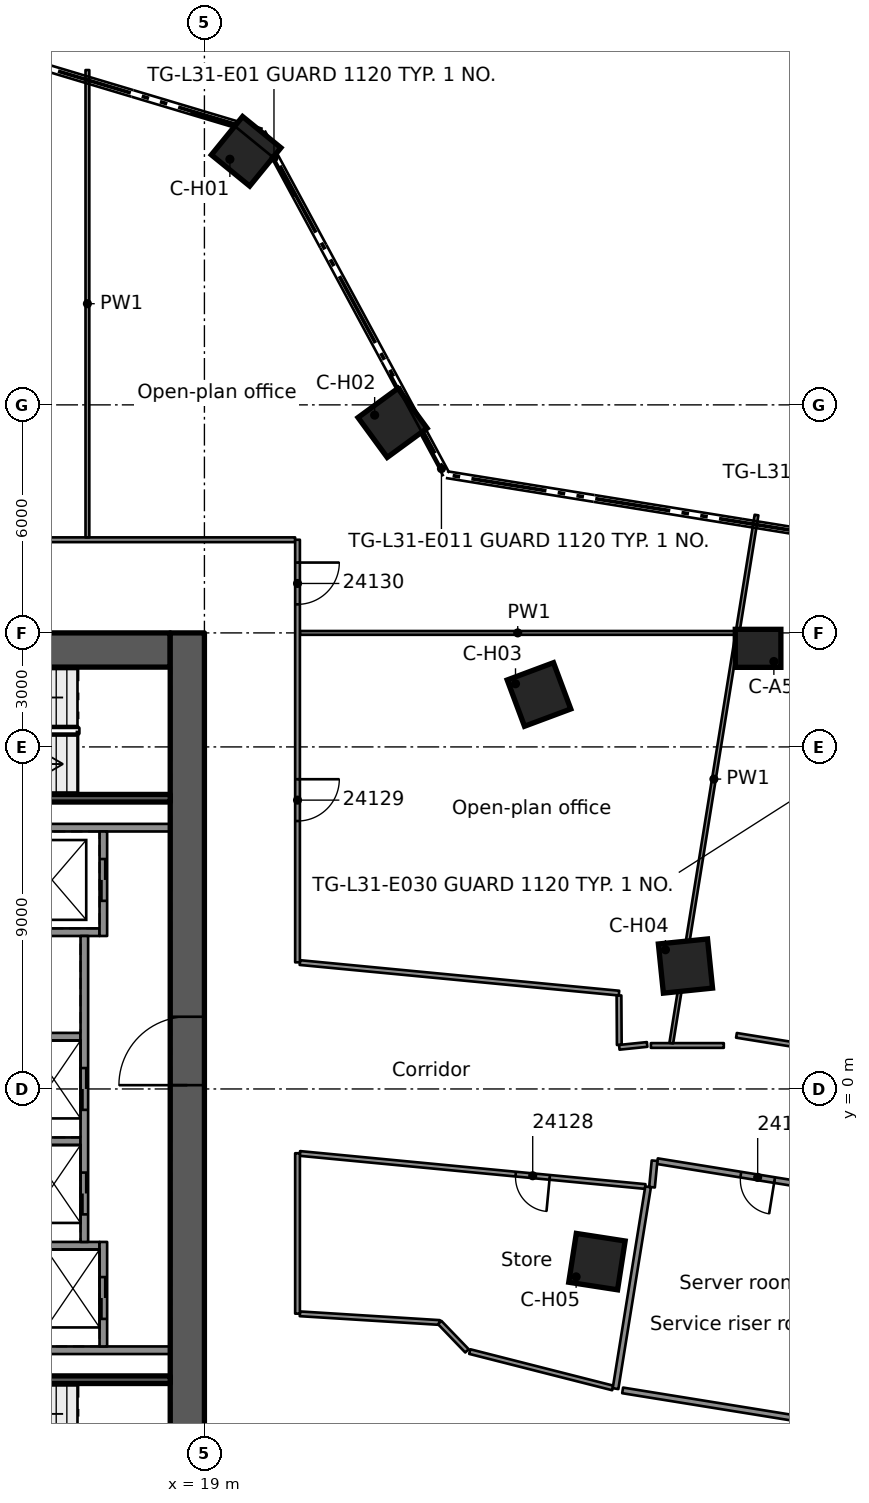
"""IFC4 building model, lengths in metres.
Left out: names, types, materials, properties, quantities, classifications, styles, units other than length and angle.
Written with IfcOpenShell. Run it as: python <this file> out.ifc"""

import sys

from ifc_helpers import new_model, si_unit, direction, frame, frame_2d, origin, origin_2d, place, context, subcontext, project, spatial, rectangle, extrude, element, fill, save


model = new_model("IFC4")
c1 = context("Model", 3, precision=1e-05, world=origin(), true_north=direction((0.0, 1.0)))
c2 = subcontext(c1, "Body", "Model", "MODEL_VIEW")
j1 = project(units=[si_unit("LENGTHUNIT", "METRE"), si_unit("PLANEANGLEUNIT", "RADIAN")], contexts=[c1])
p1 = place(None, origin())
s1 = spatial("IfcSite", under=j1, at=p1, CompositionType="ELEMENT")
p2 = place(p1, origin())
s2 = spatial("IfcBuilding", under=s1, at=p2, CompositionType="ELEMENT")
p3 = place(p2, frame((0.0, 0.0, 123.7)))
s3 = spatial("IfcBuildingStorey", under=s2, at=p3, CompositionType="ELEMENT", Elevation=123.7)
p4 = place(p3, frame((8.9, 11.55, 0.0), z_axis=(0.0, 0.0, 1.0), x_axis=(1.0, 0.0, 0.0)))
e1 = element("IfcWall", 1, at=p4, inside=s3, PredefinedType="SHEAR", context=c2, shape_type="SweptSolid", body=[
    extrude(rectangle(XDim=9.2, YDim=0.9, at=frame_2d((4.6, 0.0))), origin(), (0.0, 0.0, 1.0), 3.5),
])
p5 = place(p4, frame((3.0, 0.0, 0.0)))
e2 = element("IfcOpeningElement", 2, at=p5, cuts=e1, PredefinedType="OPENING", context=c2, shape_type="SweptSolid", body=[
    extrude(rectangle(XDim=1.1, YDim=2.1, at=frame_2d((0.55, 1.05))), frame((0.0, 0.46, 0.0), z_axis=(0.0, -1.0, 0.0), x_axis=(1.0, 0.0, 0.0)), (0.0, 0.0, 1.0), 0.92),
])
p6 = place(p3, frame((18.55, -12.0, 0.0), z_axis=(0.0, 0.0, 1.0), x_axis=(0.0, 1.0, 0.0)))
e3 = element("IfcWall", 3, at=p6, inside=s3, PredefinedType="SHEAR", context=c2, shape_type="SweptSolid", body=[
    extrude(rectangle(XDim=24.0, YDim=0.9, at=frame_2d((12.0, 0.0))), origin(), (0.0, 0.0, 1.0), 3.5),
])
p7 = place(p6, frame((12.1, 0.0, 0.0)))
e4 = element("IfcOpeningElement", 4, at=p7, cuts=e3, PredefinedType="OPENING", context=c2, shape_type="SweptSolid", body=[
    extrude(rectangle(XDim=1.8, YDim=2.1, at=frame_2d((0.9, 1.05))), frame((0.0, 0.46, 0.0), z_axis=(0.0, -1.0, 0.0), x_axis=(1.0, 0.0, 0.0)), (0.0, 0.0, 1.0), 0.92),
])
p8 = place(p3, frame((33.569, 11.594, 0.0), z_axis=(0.0, 0.0, 1.0), x_axis=(1.0, 0.0, 0.0)))
e5 = element("IfcColumn", 5, at=p8, inside=s3, PredefinedType="COLUMN", context=c2, shape_type="SweptSolid", body=[
    extrude(rectangle(XDim=1.2, YDim=1.0, at=origin_2d()), origin(), (0.0, 0.0, 1.0), 3.5),
])
for number, where, z_axis, x_axis in (
    (6, (20.098, 24.672, 0.0), (0.0, 0.0, 1.0), (0.632, 0.775, 0.0)),
    (7, (23.951, 17.526, 0.0), (0.0, 0.0, 1.0), (0.807, 0.591, 0.0)),
    (8, (27.804, 10.38, 0.0), (0.0, 0.0, 1.0), (0.937, 0.35, 0.0)),
    (9, (31.658, 3.234, 0.0), (0.0, 0.0, 1.0), (0.995, 0.102, 0.0)),
    (10, (29.329, -4.543, 0.0), (0.0, 0.0, 1.0), (0.988, -0.153, 0.0)),
):
    element("IfcColumn", number, at=place(p3, frame(where, z_axis=z_axis, x_axis=x_axis)), inside=s3, PredefinedType="COLUMN", context=c2, shape_type="SweptSolid", body=[
        extrude(rectangle(XDim=1.3, YDim=1.3, at=origin_2d()), origin(), (0.0, 0.0, 1.0), 3.5),
    ])
for number, where, z_axis, x_axis in (
    (11, (11.54, -6.875, 0.0), (0.0, 0.0, 1.0), (1.0, 0.0, 0.0)),
    (12, (11.54, 6.875, 0.0), (0.0, 0.0, 1.0), (1.0, 0.0, 0.0)),
):
    element("IfcWall", number, at=place(p3, frame(where, z_axis=z_axis, x_axis=x_axis)), inside=s3, PredefinedType="SOLIDWALL", context=c2, shape_type="SweptSolid", body=[
        extrude(rectangle(XDim=6.56, YDim=0.2, at=frame_2d((3.28, 0.0))), origin(), (0.0, 0.0, 1.0), 3.09),
    ])
p9 = place(p3, frame((11.54, 4.125, 0.0), z_axis=(0.0, 0.0, 1.0), x_axis=(1.0, 0.0, 0.0)))
e13 = element("IfcWall", 13, at=p9, inside=s3, PredefinedType="SOLIDWALL", context=c2, shape_type="SweptSolid", body=[
    extrude(rectangle(XDim=4.7, YDim=0.2, at=frame_2d((2.35, 0.0))), origin(), (0.0, 0.0, 1.0), 3.09),
])
for number, where, z_axis, x_axis in (
    (14, (11.54, 1.375, 0.0), (0.0, 0.0, 1.0), (1.0, 0.0, 0.0)),
    (15, (11.54, -1.375, 0.0), (0.0, 0.0, 1.0), (1.0, 0.0, 0.0)),
):
    element("IfcWall", number, at=place(p3, frame(where, z_axis=z_axis, x_axis=x_axis)), inside=s3, PredefinedType="SOLIDWALL", context=c2, shape_type="SweptSolid", body=[
        extrude(rectangle(XDim=4.2, YDim=0.2, at=frame_2d((2.1, 0.0))), origin(), (0.0, 0.0, 1.0), 3.09),
    ])
p10 = place(p3, frame((11.54, -4.125, 0.0), z_axis=(0.0, 0.0, 1.0), x_axis=(1.0, 0.0, 0.0)))
e16 = element("IfcWall", 16, at=p10, inside=s3, PredefinedType="SOLIDWALL", context=c2, shape_type="SweptSolid", body=[
    extrude(rectangle(XDim=4.7, YDim=0.2, at=frame_2d((2.35, 0.0))), origin(), (0.0, 0.0, 1.0), 3.09),
])
p11 = place(p3, frame((16.34, 6.775, 0.0), z_axis=(0.0, 0.0, 1.0), x_axis=(0.0, -1.0, 0.0)))
e17 = element("IfcWall", 17, at=p11, inside=s3, PredefinedType="SOLIDWALL", context=c2, shape_type="SweptSolid", body=[
    extrude(rectangle(XDim=2.75, YDim=0.2, at=frame_2d((1.375, 0.0))), origin(), (0.0, 0.0, 1.0), 3.09),
])
p12 = place(p11, frame((0.725, 0.0, 0.0)))
e18 = element("IfcOpeningElement", 18, at=p12, cuts=e17, PredefinedType="OPENING", context=c2, shape_type="SweptSolid", body=[
    extrude(rectangle(XDim=1.1, YDim=2.1, at=frame_2d((0.55, 1.05))), frame((0.0, 0.11, 0.0), z_axis=(0.0, -1.0, 0.0), x_axis=(1.0, 0.0, 0.0)), (0.0, 0.0, 1.0), 0.22),
])
p13 = place(p3, frame((15.84, 4.025, 0.0), z_axis=(0.0, 0.0, 1.0), x_axis=(0.0, -1.0, 0.0)))
e19 = element("IfcWall", 19, at=p13, inside=s3, PredefinedType="SOLIDWALL", context=c2, shape_type="SweptSolid", body=[
    extrude(rectangle(XDim=8.05, YDim=0.2, at=frame_2d((4.025, 0.0))), origin(), (0.0, 0.0, 1.0), 3.09),
])
p14 = place(p13, frame((3.475, 0.0, 0.0)))
e20 = element("IfcOpeningElement", 20, at=p14, cuts=e19, PredefinedType="OPENING", context=c2, shape_type="SweptSolid", body=[
    extrude(rectangle(XDim=1.1, YDim=2.1, at=frame_2d((0.55, 1.05))), frame((0.0, 0.11, 0.0), z_axis=(0.0, -1.0, 0.0), x_axis=(1.0, 0.0, 0.0)), (0.0, 0.0, 1.0), 0.22),
])
p15 = place(p13, frame((6.225, 0.0, 0.0)))
e21 = element("IfcOpeningElement", 21, at=p15, cuts=e19, PredefinedType="OPENING", context=c2, shape_type="SweptSolid", body=[
    extrude(rectangle(XDim=1.1, YDim=2.1, at=frame_2d((0.55, 1.05))), frame((0.0, 0.11, 0.0), z_axis=(0.0, -1.0, 0.0), x_axis=(1.0, 0.0, 0.0)), (0.0, 0.0, 1.0), 0.22),
])
p16 = place(p3, frame((16.34, -4.025, 0.0), z_axis=(0.0, 0.0, 1.0), x_axis=(0.0, -1.0, 0.0)))
e22 = element("IfcWall", 22, at=p16, inside=s3, PredefinedType="SOLIDWALL", context=c2, shape_type="SweptSolid", body=[
    extrude(rectangle(XDim=2.75, YDim=0.2, at=frame_2d((1.375, 0.0))), origin(), (0.0, 0.0, 1.0), 3.09),
])
p17 = place(p16, frame((0.925, 0.0, 0.0)))
e23 = element("IfcOpeningElement", 23, at=p17, cuts=e22, PredefinedType="OPENING", context=c2, shape_type="SweptSolid", body=[
    extrude(rectangle(XDim=1.1, YDim=2.1, at=frame_2d((0.55, 1.05))), frame((0.0, 0.11, 0.0), z_axis=(0.0, -1.0, 0.0), x_axis=(1.0, 0.0, 0.0)), (0.0, 0.0, 1.0), 0.22),
])
for number, where, z_axis, x_axis in (
    (24, (11.54, -7.65, 0.0), (0.0, 0.0, 1.0), (1.0, 0.0, 0.0)),
    (25, (11.54, 7.65, 0.0), (0.0, 0.0, 1.0), (1.0, 0.0, 0.0)),
):
    element("IfcWall", number, at=place(p3, frame(where, z_axis=z_axis, x_axis=x_axis)), inside=s3, PredefinedType="SOLIDWALL", context=c2, shape_type="SweptSolid", body=[
        extrude(rectangle(XDim=6.56, YDim=0.2, at=frame_2d((3.28, 0.0))), origin(), (0.0, 0.0, 1.0), 3.09),
    ])
p18 = place(p3, frame((29.917, 1.158, 0.0), z_axis=(0.0, 0.0, 1.0), x_axis=(-0.006187768279, 0.999980855579, 0.0)))
e26 = element("IfcWall", 26, at=p18, inside=s3, PredefinedType="PARTITIONING", context=c2, shape_type="SweptSolid", body=[
    extrude(rectangle(XDim=1.302, YDim=0.125, at=frame_2d((0.651, 0.0))), origin(), (0.0, 0.0, 1.0), 3.08),
])
p19 = place(p3, frame((29.745, -7.867, 0.0), z_axis=(0.0, 0.0, 1.0), x_axis=(-0.969150714626, 0.24646884659, 0.0)))
e27 = element("IfcWall", 27, at=p19, inside=s3, PredefinedType="PARTITIONING", context=c2, shape_type="SweptSolid", body=[
    extrude(rectangle(XDim=3.883, YDim=0.125, at=frame_2d((1.941, 0.0))), origin(), (0.0, 0.0, 1.0), 3.08),
])
p20 = place(p3, frame((30.005, -7.931, 0.0), z_axis=(0.0, 0.0, 1.0), x_axis=(0.987232842174, -0.15928375728, 0.0)))
e28 = element("IfcWall", 28, at=p20, inside=s3, PredefinedType="PARTITIONING", context=c2, shape_type="SweptSolid", body=[
    extrude(rectangle(XDim=21.239, YDim=0.15, at=frame_2d((10.62, 0.0))), origin(), (0.0, 0.0, 1.0), 3.08),
])
p21 = place(p3, frame((51.945, -5.294, 0.0), z_axis=(0.0, 0.0, 1.0), x_axis=(-0.98722094224, 0.159357494967, 0.0)))
e29 = element("IfcWall", 29, at=p21, inside=s3, PredefinedType="PARTITIONING", context=c2, shape_type="SweptSolid", body=[
    extrude(rectangle(XDim=21.298, YDim=0.15, at=frame_2d((10.649, 0.0))), origin(), (0.0, 0.0, 1.0), 3.08),
])
p22 = place(p21, frame((12.624, 0.0, 0.0)))
e30 = element("IfcOpeningElement", 30, at=p22, cuts=e29, PredefinedType="OPENING", context=c2, shape_type="SweptSolid", body=[
    extrude(rectangle(XDim=0.9, YDim=2.1, at=frame_2d((0.45, 1.05))), frame((0.0, 0.085, 0.0), z_axis=(0.0, -1.0, 0.0), x_axis=(1.0, 0.0, 0.0)), (0.0, 0.0, 1.0), 0.17),
])
p23 = place(p21, frame((0.525, 0.0, 0.0)))
e31 = element("IfcOpeningElement", 31, at=p23, cuts=e29, PredefinedType="OPENING", context=c2, shape_type="SweptSolid", body=[
    extrude(rectangle(XDim=0.9, YDim=2.1, at=frame_2d((0.45, 1.05))), frame((0.0, 0.085, 0.0), z_axis=(0.0, -1.0, 0.0), x_axis=(1.0, 0.0, 0.0)), (0.0, 0.0, 1.0), 0.17),
])
p24 = place(p21, frame((18.175, 0.0, 0.0)))
e32 = element("IfcOpeningElement", 32, at=p24, cuts=e29, PredefinedType="OPENING", context=c2, shape_type="SweptSolid", body=[
    extrude(rectangle(XDim=0.9, YDim=2.1, at=frame_2d((0.45, 1.05))), frame((0.0, 0.085, 0.0), z_axis=(0.0, -1.0, 0.0), x_axis=(1.0, 0.0, 0.0)), (0.0, 0.0, 1.0), 0.17),
])
p25 = place(p21, frame((5.675, 0.0, 0.0)))
e33 = element("IfcOpeningElement", 33, at=p25, cuts=e29, PredefinedType="OPENING", context=c2, shape_type="SweptSolid", body=[
    extrude(rectangle(XDim=0.9, YDim=2.1, at=frame_2d((0.45, 1.05))), frame((0.0, 0.085, 0.0), z_axis=(0.0, -1.0, 0.0), x_axis=(1.0, 0.0, 0.0)), (0.0, 0.0, 1.0), 0.17),
])
p26 = place(p3, frame((33.0, 1.411, 0.0), z_axis=(0.0, 0.0, 1.0), x_axis=(0.987218652985, -0.159371676275, 0.0)))
e34 = element("IfcWall", 34, at=p26, inside=s3, PredefinedType="PARTITIONING", context=c2, shape_type="SweptSolid", body=[
    extrude(rectangle(XDim=19.846, YDim=0.125, at=frame_2d((9.923, 0.0))), origin(), (0.0, 0.0, 1.0), 3.08),
])
p27 = place(p26, frame((1.6, 0.0, 0.0)))
e35 = element("IfcOpeningElement", 35, at=p27, cuts=e34, PredefinedType="OPENING", context=c2, shape_type="SweptSolid", body=[
    extrude(rectangle(XDim=0.9, YDim=2.1, at=frame_2d((0.45, 1.05))), frame((0.0, 0.073, 0.0), z_axis=(0.0, -1.0, 0.0), x_axis=(1.0, 0.0, 0.0)), (0.0, 0.0, 1.0), 0.145),
])
p28 = place(p26, frame((13.096, 0.0, 0.0)))
e36 = element("IfcOpeningElement", 36, at=p28, cuts=e34, PredefinedType="OPENING", context=c2, shape_type="SweptSolid", body=[
    extrude(rectangle(XDim=1.1, YDim=2.1, at=frame_2d((0.55, 1.05))), frame((0.0, 0.073, 0.0), z_axis=(0.0, -1.0, 0.0), x_axis=(1.0, 0.0, 0.0)), (0.0, 0.0, 1.0), 0.145),
])
p29 = place(p3, frame((30.6, -2.567, 0.0), z_axis=(0.0, 0.0, 1.0), x_axis=(-0.995450531819, 0.095279791669, 0.0)))
e37 = element("IfcWall", 37, at=p29, inside=s3, PredefinedType="PARTITIONING", context=c2, shape_type="SweptSolid", body=[
    extrude(rectangle(XDim=9.13, YDim=0.125, at=frame_2d((4.565, 0.0))), origin(), (0.0, 0.0, 1.0), 3.08),
])
p30 = place(p29, frame((2.525, 0.0, 0.0)))
e38 = element("IfcOpeningElement", 38, at=p30, cuts=e37, PredefinedType="OPENING", context=c2, shape_type="SweptSolid", body=[
    extrude(rectangle(XDim=0.9, YDim=2.1, at=frame_2d((0.45, 1.05))), frame((0.0, 0.073, 0.0), z_axis=(0.0, -1.0, 0.0), x_axis=(1.0, 0.0, 0.0)), (0.0, 0.0, 1.0), 0.145),
])
p31 = place(p3, frame((21.512, 3.326, 0.0), z_axis=(0.0, 0.0, 1.0), x_axis=(0.995447869082, -0.095307606934, 0.0)))
e39 = element("IfcWall", 39, at=p31, inside=s3, PredefinedType="PARTITIONING", context=c2, shape_type="SweptSolid", body=[
    extrude(rectangle(XDim=8.435, YDim=0.125, at=frame_2d((4.218, 0.0))), origin(), (0.0, 0.0, 1.0), 3.08),
])
p32 = place(p3, frame((21.512, -5.916, 0.0), z_axis=(0.0, 0.0, 1.0), x_axis=(0.998068267511, -0.0621267526, 0.0)))
e40 = element("IfcWall", 40, at=p32, inside=s3, PredefinedType="PARTITIONING", context=c2, shape_type="SweptSolid", body=[
    extrude(rectangle(XDim=3.686, YDim=0.125, at=frame_2d((1.843, 0.0))), origin(), (0.0, 0.0, 1.0), 3.08),
])
p33 = place(p3, frame((30.748, 1.144, 0.0), z_axis=(0.0, 0.0, 1.0), x_axis=(1.0, 0.0, 0.0)))
e41 = element("IfcWall", 41, at=p33, inside=s3, PredefinedType="PARTITIONING", context=c2, shape_type="SweptSolid", body=[
    extrude(rectangle(XDim=1.919, YDim=0.125, at=frame_2d((0.959, 0.0))), origin(), (0.0, 0.0, 1.0), 3.08),
])
p34 = place(p3, frame((21.512, 12.0, 0.0), z_axis=(0.0, 0.0, 1.0), x_axis=(1.0, 0.0, 0.0)))
e42 = element("IfcWall", 42, at=p34, inside=s3, PredefinedType="PARTITIONING", context=c2, shape_type="SweptSolid", body=[
    extrude(rectangle(XDim=11.465, YDim=0.1, at=frame_2d((5.732, 0.0))), origin(), (0.0, 0.0, 1.0), 3.08),
])
p35 = place(p3, frame((10.391, 14.451, 0.0), z_axis=(0.0, 0.0, 1.0), x_axis=(1.0, 0.0, 0.0)))
e43 = element("IfcWall", 43, at=p35, inside=s3, PredefinedType="PARTITIONING", context=c2, shape_type="SweptSolid", body=[
    extrude(rectangle(XDim=10.996, YDim=0.125, at=frame_2d((5.498, 0.0))), origin(), (0.0, 0.0, 1.0), 3.08),
])
p36 = place(p3, frame((29.917, 1.096, 0.0), z_axis=(0.0, 0.0, 1.0), x_axis=(0.994811579601, 0.101734561938, 0.0)))
e44 = element("IfcWall", 44, at=p36, inside=s3, PredefinedType="PARTITIONING", context=c2, shape_type="SweptSolid", body=[
    extrude(rectangle(XDim=0.737, YDim=0.125, at=frame_2d((0.368, 0.0))), origin(), (0.0, 0.0, 1.0), 3.08),
])
p37 = place(p3, frame((29.818, -7.885, 0.0), z_axis=(0.0, 0.0, 1.0), x_axis=(0.159318061913, 0.987227306727, 0.0)))
e45 = element("IfcWall", 45, at=p37, inside=s3, PredefinedType="PARTITIONING", context=c2, shape_type="SweptSolid", body=[
    extrude(rectangle(XDim=5.379, YDim=0.15, at=frame_2d((2.689, 0.0))), origin(), (0.0, 0.0, 1.0), 3.08),
])
p38 = place(p3, frame((31.285, 1.206, 0.0), z_axis=(0.0, 0.0, 1.0), x_axis=(0.159373138674, 0.987218416901, 0.0)))
e46 = element("IfcWall", 46, at=p38, inside=s3, PredefinedType="PARTITIONING", context=c2, shape_type="SweptSolid", body=[
    extrude(rectangle(XDim=14.075, YDim=0.1, at=frame_2d((7.038, 0.0))), origin(), (0.0, 0.0, 1.0), 3.08),
])
p39 = place(p3, frame((30.778, -2.585, 0.0), z_axis=(0.0, 0.0, 1.0), x_axis=(0.095533028174, 0.995426260718, 0.0)))
e47 = element("IfcWall", 47, at=p39, inside=s3, PredefinedType="PARTITIONING", context=c2, shape_type="SweptSolid", body=[
    extrude(rectangle(XDim=0.7, YDim=0.15, at=frame_2d((0.35, 0.0))), origin(), (0.0, 0.0, 1.0), 3.08),
])
p40 = place(p3, frame((25.909, -6.891, 0.0), z_axis=(0.0, 0.0, 1.0), x_axis=(-0.693419637935, 0.720533972638, 0.0)))
e48 = element("IfcWall", 48, at=p40, inside=s3, PredefinedType="PARTITIONING", context=c2, shape_type="SweptSolid", body=[
    extrude(rectangle(XDim=1.035, YDim=0.125, at=frame_2d((0.518, 0.0))), origin(), (0.0, 0.0, 1.0), 3.08),
])
p41 = place(p3, frame((21.45, -5.912, 0.0), z_axis=(0.0, 0.0, 1.0), x_axis=(0.0, 1.0, 0.0)))
e49 = element("IfcWall", 49, at=p41, inside=s3, PredefinedType="PARTITIONING", context=c2, shape_type="SweptSolid", body=[
    extrude(rectangle(XDim=4.221, YDim=0.125, at=frame_2d((2.111, 0.0))), origin(), (0.0, 0.0, 1.0), 3.08),
])
p42 = place(p3, frame((21.45, 14.451, 0.0), z_axis=(0.0, 0.0, 1.0), x_axis=(0.0, -1.0, 0.0)))
e50 = element("IfcWall", 50, at=p42, inside=s3, PredefinedType="PARTITIONING", context=c2, shape_type="SweptSolid", body=[
    extrude(rectangle(XDim=11.119, YDim=0.125, at=frame_2d((5.56, 0.0))), origin(), (0.0, 0.0, 1.0), 3.08),
])
p43 = place(p42, frame((6.301, 0.0, 0.0)))
e51 = element("IfcOpeningElement", 51, at=p43, cuts=e50, PredefinedType="OPENING", context=c2, shape_type="SweptSolid", body=[
    extrude(rectangle(XDim=1.1, YDim=2.1, at=frame_2d((0.55, 1.05))), frame((0.0, 0.073, 0.0), z_axis=(0.0, -1.0, 0.0), x_axis=(1.0, 0.0, 0.0)), (0.0, 0.0, 1.0), 0.145),
])
p44 = place(p42, frame((0.6, 0.0, 0.0)))
e52 = element("IfcOpeningElement", 52, at=p44, cuts=e50, PredefinedType="OPENING", context=c2, shape_type="SweptSolid", body=[
    extrude(rectangle(XDim=1.1, YDim=2.1, at=frame_2d((0.55, 1.05))), frame((0.0, 0.073, 0.0), z_axis=(0.0, -1.0, 0.0), x_axis=(1.0, 0.0, 0.0)), (0.0, 0.0, 1.0), 0.145),
])
p45 = place(p3, frame((15.921, 14.514, 0.0), z_axis=(0.0, 0.0, 1.0), x_axis=(0.0, 1.0, 0.0)))
e53 = element("IfcWall", 53, at=p45, inside=s3, PredefinedType="PARTITIONING", context=c2, shape_type="SweptSolid", body=[
    extrude(rectangle(XDim=12.296, YDim=0.1, at=frame_2d((6.148, 0.0))), origin(), (0.0, 0.0, 1.0), 3.08),
])
p46 = place(p12, origin())
e54 = element("IfcDoor", 54, at=p46, inside=s3, OperationType="DOUBLE_DOOR_SLIDING", PredefinedType="DOOR", context=c2, shape_type="SweptSolid", body=[
    extrude(rectangle(XDim=1.1, YDim=2.1, at=frame_2d((0.55, 1.05))), frame((0.0, 0.025, 0.0), z_axis=(0.0, -1.0, 0.0), x_axis=(1.0, 0.0, 0.0)), (0.0, 0.0, 1.0), 0.05),
])
fill(e18, e54)
p47 = place(p14, origin())
e55 = element("IfcDoor", 55, at=p47, inside=s3, OperationType="DOUBLE_DOOR_SLIDING", PredefinedType="DOOR", context=c2, shape_type="SweptSolid", body=[
    extrude(rectangle(XDim=1.1, YDim=2.1, at=frame_2d((0.55, 1.05))), frame((0.0, 0.025, 0.0), z_axis=(0.0, -1.0, 0.0), x_axis=(1.0, 0.0, 0.0)), (0.0, 0.0, 1.0), 0.05),
])
fill(e20, e55)
p48 = place(p15, origin())
e56 = element("IfcDoor", 56, at=p48, inside=s3, OperationType="DOUBLE_DOOR_SLIDING", PredefinedType="DOOR", context=c2, shape_type="SweptSolid", body=[
    extrude(rectangle(XDim=1.1, YDim=2.1, at=frame_2d((0.55, 1.05))), frame((0.0, 0.025, 0.0), z_axis=(0.0, -1.0, 0.0), x_axis=(1.0, 0.0, 0.0)), (0.0, 0.0, 1.0), 0.05),
])
fill(e21, e56)
p49 = place(p17, origin())
e57 = element("IfcDoor", 57, at=p49, inside=s3, OperationType="DOUBLE_DOOR_SLIDING", PredefinedType="DOOR", context=c2, shape_type="SweptSolid", body=[
    extrude(rectangle(XDim=1.1, YDim=2.1, at=frame_2d((0.55, 1.05))), frame((0.0, 0.025, 0.0), z_axis=(0.0, -1.0, 0.0), x_axis=(1.0, 0.0, 0.0)), (0.0, 0.0, 1.0), 0.05),
])
fill(e23, e57)
p50 = place(p7, origin())
e58 = element("IfcDoor", 58, at=p50, inside=s3, OperationType="SINGLE_SWING_RIGHT", PredefinedType="DOOR", context=c2, shape_type="SweptSolid", body=[
    extrude(rectangle(XDim=1.8, YDim=2.1, at=frame_2d((0.9, 1.05))), frame((0.0, 0.025, 0.0), z_axis=(0.0, -1.0, 0.0), x_axis=(1.0, 0.0, 0.0)), (0.0, 0.0, 1.0), 0.05),
])
fill(e4, e58)
p51 = place(p24, origin())
e59 = element("IfcDoor", 59, at=p51, inside=s3, OperationType="SINGLE_SWING_RIGHT", PredefinedType="DOOR", context=c2, shape_type="SweptSolid", body=[
    extrude(rectangle(XDim=0.9, YDim=2.1, at=frame_2d((0.45, 1.05))), frame((0.0, 0.025, 0.0), z_axis=(0.0, -1.0, 0.0), x_axis=(1.0, 0.0, 0.0)), (0.0, 0.0, 1.0), 0.05),
])
fill(e32, e59)
p52 = place(p30, origin())
e60 = element("IfcDoor", 60, at=p52, inside=s3, OperationType="SINGLE_SWING_LEFT", PredefinedType="DOOR", context=c2, shape_type="SweptSolid", body=[
    extrude(rectangle(XDim=0.9, YDim=2.1, at=frame_2d((0.45, 1.05))), frame((0.0, 0.025, 0.0), z_axis=(0.0, -1.0, 0.0), x_axis=(1.0, 0.0, 0.0)), (0.0, 0.0, 1.0), 0.05),
])
fill(e38, e60)
p53 = place(p43, origin())
e61 = element("IfcDoor", 61, at=p53, inside=s3, OperationType="SINGLE_SWING_RIGHT", PredefinedType="DOOR", context=c2, shape_type="SweptSolid", body=[
    extrude(rectangle(XDim=1.1, YDim=2.1, at=frame_2d((0.55, 1.05))), frame((0.0, 0.025, 0.0), z_axis=(0.0, -1.0, 0.0), x_axis=(1.0, 0.0, 0.0)), (0.0, 0.0, 1.0), 0.05),
])
fill(e51, e61)
p54 = place(p44, origin())
e62 = element("IfcDoor", 62, at=p54, inside=s3, OperationType="SINGLE_SWING_LEFT", PredefinedType="DOOR", context=c2, shape_type="SweptSolid", body=[
    extrude(rectangle(XDim=1.1, YDim=2.1, at=frame_2d((0.55, 1.05))), frame((0.0, 0.025, 0.0), z_axis=(0.0, -1.0, 0.0), x_axis=(1.0, 0.0, 0.0)), (0.0, 0.0, 1.0), 0.05),
])
fill(e52, e62)
save(model, sys.argv[1])
